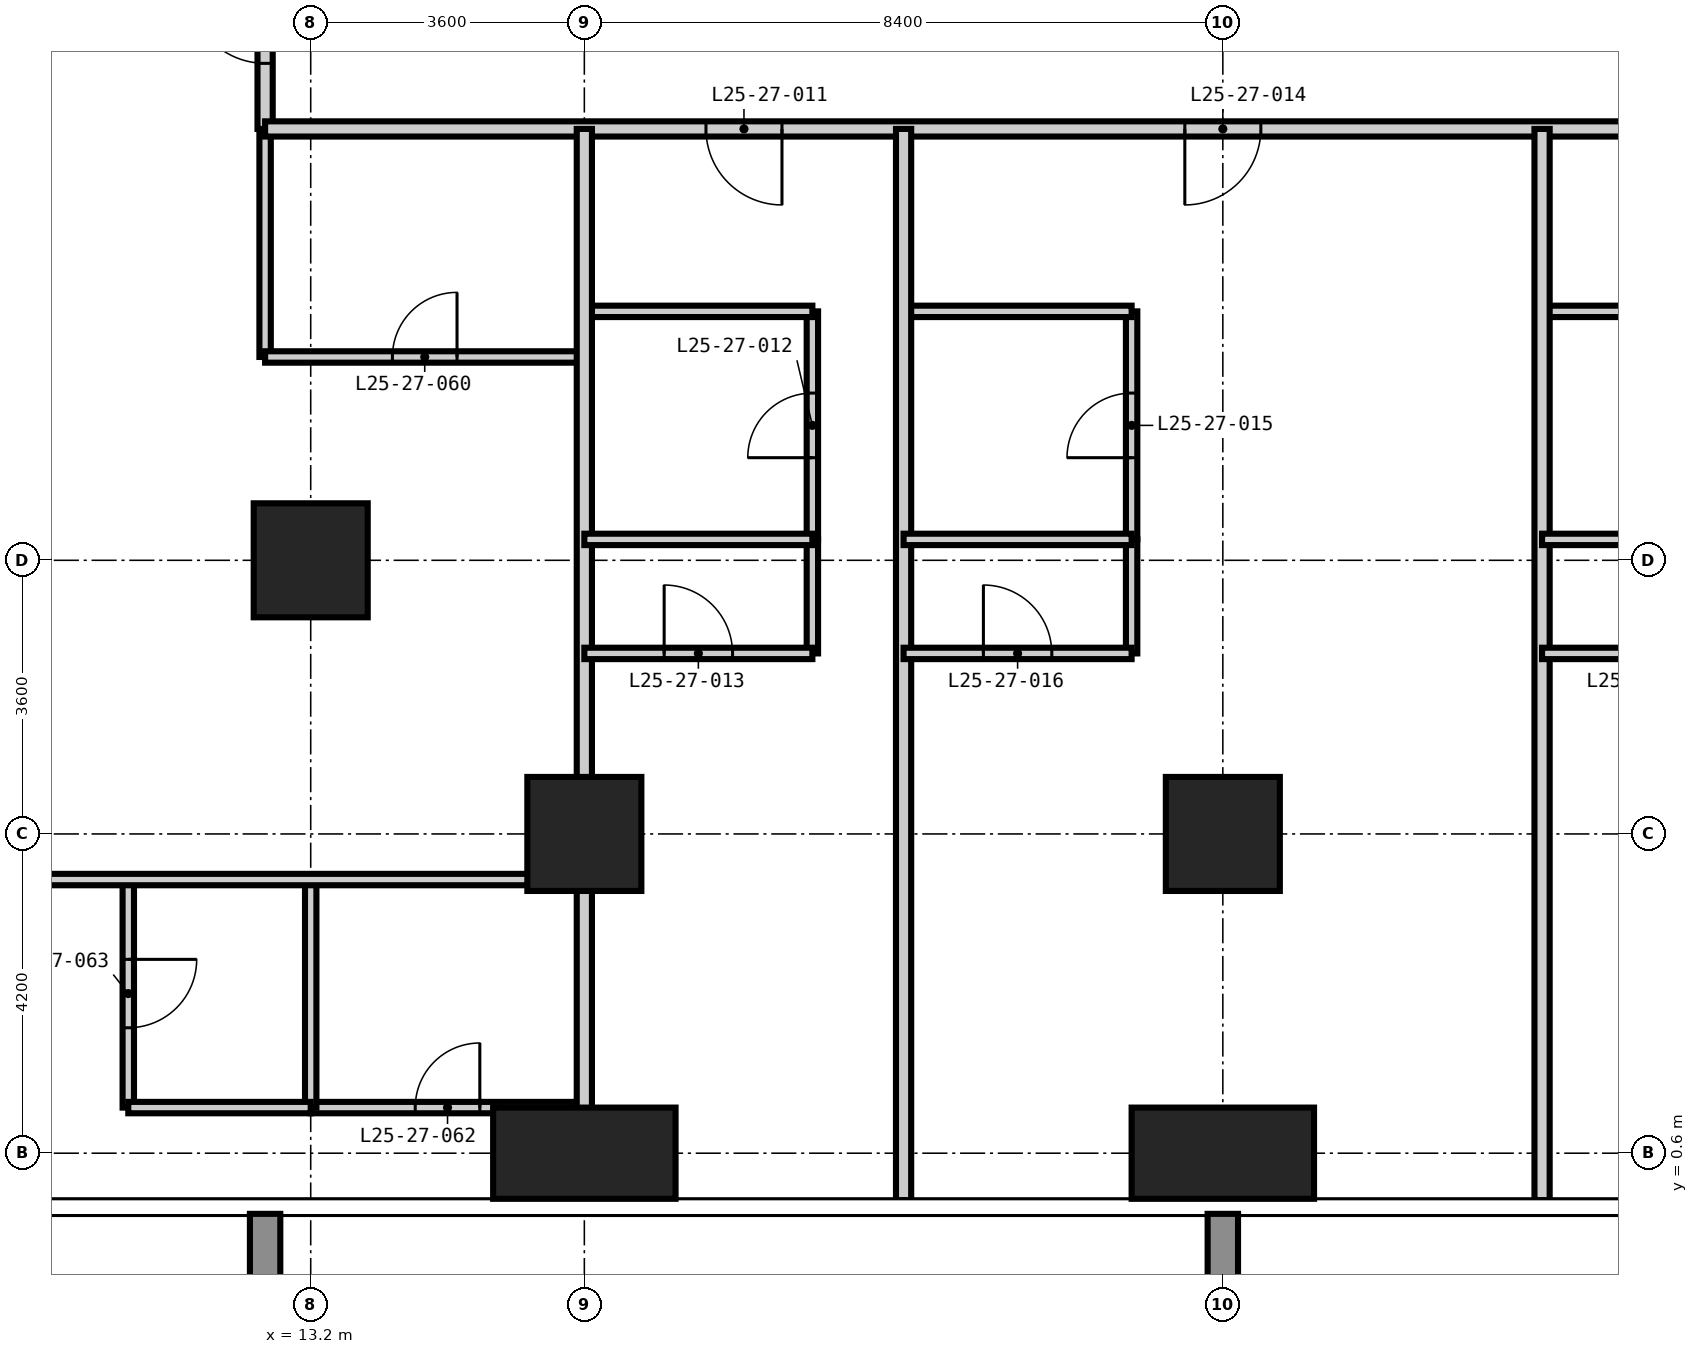
"""IFC4 building model, lengths in metres.
Left out: names, types, materials, properties, quantities, classifications, styles, units other than length and angle.
Written with IfcOpenShell. Run it as: python <this file> out.ifc"""

import sys

from ifc_helpers import new_model, si_unit, direction, frame, frame_2d, origin, origin_2d, place, context, subcontext, project, spatial, rectangle, extrude, element, fill, save


model = new_model("IFC4")
c1 = context("Model", 3, precision=1e-05, world=origin(), true_north=direction((0.0, 1.0)))
c2 = subcontext(c1, "Body", "Model", "MODEL_VIEW")
j1 = project(units=[si_unit("LENGTHUNIT", "METRE"), si_unit("PLANEANGLEUNIT", "RADIAN")], contexts=[c1])
p1 = place(None, origin())
s1 = spatial("IfcSite", under=j1, at=p1, CompositionType="ELEMENT")
p2 = place(p1, origin())
s2 = spatial("IfcBuilding", under=s1, at=p2, CompositionType="ELEMENT")
p3 = place(p2, frame((0.0, 0.0, 100.8)))
s3 = spatial("IfcBuildingStorey", under=s2, at=p3, CompositionType="ELEMENT", Elevation=100.8)
p4 = place(p3, frame((13.2, 8.4, -0.35), z_axis=(0.0, 0.0, 1.0), x_axis=(1.0, 0.0, 0.0)))
e1 = element("IfcColumn", 1, at=p4, inside=s3, PredefinedType="COLUMN", context=c2, shape_type="SweptSolid", body=[
    extrude(rectangle(XDim=1.5, YDim=1.5, at=origin_2d()), origin(), (0.0, 0.0, 1.0), 3.6),
])
p5 = place(p3, frame((16.8, 0.6, -0.35), z_axis=(0.0, 0.0, 1.0), x_axis=(1.0, 0.0, 0.0)))
e2 = element("IfcColumn", 2, at=p5, inside=s3, PredefinedType="COLUMN", context=c2, shape_type="SweptSolid", body=[
    extrude(rectangle(XDim=2.4, YDim=1.2, at=origin_2d()), origin(), (0.0, 0.0, 1.0), 3.6),
])
p6 = place(p3, frame((16.8, 4.8, -0.35), z_axis=(0.0, 0.0, 1.0), x_axis=(1.0, 0.0, 0.0)))
e3 = element("IfcColumn", 3, at=p6, inside=s3, PredefinedType="COLUMN", context=c2, shape_type="SweptSolid", body=[
    extrude(rectangle(XDim=1.5, YDim=1.5, at=origin_2d()), origin(), (0.0, 0.0, 1.0), 3.6),
])
p7 = place(p3, frame((25.2, 0.6, -0.35), z_axis=(0.0, 0.0, 1.0), x_axis=(1.0, 0.0, 0.0)))
e4 = element("IfcColumn", 4, at=p7, inside=s3, PredefinedType="COLUMN", context=c2, shape_type="SweptSolid", body=[
    extrude(rectangle(XDim=2.4, YDim=1.2, at=origin_2d()), origin(), (0.0, 0.0, 1.0), 3.6),
])
p8 = place(p3, frame((25.2, 4.8, -0.35), z_axis=(0.0, 0.0, 1.0), x_axis=(1.0, 0.0, 0.0)))
e5 = element("IfcColumn", 5, at=p8, inside=s3, PredefinedType="COLUMN", context=c2, shape_type="SweptSolid", body=[
    extrude(rectangle(XDim=1.5, YDim=1.5, at=origin_2d()), origin(), (0.0, 0.0, 1.0), 3.6),
])
p9 = place(p3, frame((12.6, 11.075, 0.0), z_axis=(0.0, 0.0, 1.0), x_axis=(0.0, 1.0, 0.0)))
e6 = element("IfcWall", 6, at=p9, inside=s3, PredefinedType="PARTITIONING", context=c2, shape_type="SweptSolid", body=[
    extrude(rectangle(XDim=3.0, YDim=0.15, at=frame_2d((1.5, 0.0))), origin(), (0.0, 0.0, 1.0), 3.25),
])
p10 = place(p3, frame((19.8, 8.675, 0.0), z_axis=(0.0, 0.0, 1.0), x_axis=(0.0, 1.0, 0.0)))
e7 = element("IfcWall", 7, at=p10, inside=s3, PredefinedType="PARTITIONING", context=c2, shape_type="SweptSolid", body=[
    extrude(rectangle(XDim=3.0, YDim=0.15, at=frame_2d((1.5, 0.0))), origin(), (0.0, 0.0, 1.0), 3.25),
])
p11 = place(p10, frame((1.075, 0.0, 0.0)))
e8 = element("IfcOpeningElement", 8, at=p11, cuts=e7, PredefinedType="OPENING", context=c2, shape_type="SweptSolid", body=[
    extrude(rectangle(XDim=0.85, YDim=2.1, at=frame_2d((0.425, 1.05))), frame((0.0, 0.085, 0.0), z_axis=(0.0, -1.0, 0.0), x_axis=(1.0, 0.0, 0.0)), (0.0, 0.0, 1.0), 0.17),
])
p12 = place(p3, frame((24.0, 8.675, 0.0), z_axis=(0.0, 0.0, 1.0), x_axis=(0.0, 1.0, 0.0)))
e9 = element("IfcWall", 9, at=p12, inside=s3, PredefinedType="PARTITIONING", context=c2, shape_type="SweptSolid", body=[
    extrude(rectangle(XDim=3.0, YDim=0.15, at=frame_2d((1.5, 0.0))), origin(), (0.0, 0.0, 1.0), 3.25),
])
p13 = place(p12, frame((1.075, 0.0, 0.0)))
e10 = element("IfcOpeningElement", 10, at=p13, cuts=e9, PredefinedType="OPENING", context=c2, shape_type="SweptSolid", body=[
    extrude(rectangle(XDim=0.85, YDim=2.1, at=frame_2d((0.425, 1.05))), frame((0.0, 0.085, 0.0), z_axis=(0.0, -1.0, 0.0), x_axis=(1.0, 0.0, 0.0)), (0.0, 0.0, 1.0), 0.17),
])
p14 = place(p3, frame((13.2, 1.2, 0.0), z_axis=(0.0, 0.0, 1.0), x_axis=(1.0, 0.0, 0.0)))
e11 = element("IfcWall", 11, at=p14, inside=s3, PredefinedType="PARTITIONING", context=c2, shape_type="SweptSolid", body=[
    extrude(rectangle(XDim=3.6, YDim=0.15, at=frame_2d((1.8, 0.0))), origin(), (0.0, 0.0, 1.0), 3.25),
])
p15 = place(p14, frame((1.375, 0.0, 0.0)))
e12 = element("IfcOpeningElement", 12, at=p15, cuts=e11, PredefinedType="OPENING", context=c2, shape_type="SweptSolid", body=[
    extrude(rectangle(XDim=0.85, YDim=2.1, at=frame_2d((0.425, 1.05))), frame((0.0, 0.085, 0.0), z_axis=(0.0, -1.0, 0.0), x_axis=(1.0, 0.0, 0.0)), (0.0, 0.0, 1.0), 0.17),
])
p16 = place(p3, frame((12.6, 11.075, 0.0), z_axis=(0.0, 0.0, 1.0), x_axis=(1.0, 0.0, 0.0)))
e13 = element("IfcWall", 13, at=p16, inside=s3, PredefinedType="PARTITIONING", context=c2, shape_type="SweptSolid", body=[
    extrude(rectangle(XDim=4.2, YDim=0.15, at=frame_2d((2.1, 0.0))), origin(), (0.0, 0.0, 1.0), 3.25),
])
p17 = place(p16, frame((1.675, 0.0, 0.0)))
e14 = element("IfcOpeningElement", 14, at=p17, cuts=e13, PredefinedType="OPENING", context=c2, shape_type="SweptSolid", body=[
    extrude(rectangle(XDim=0.85, YDim=2.1, at=frame_2d((0.425, 1.05))), frame((0.0, 0.085, 0.0), z_axis=(0.0, -1.0, 0.0), x_axis=(1.0, 0.0, 0.0)), (0.0, 0.0, 1.0), 0.17),
])
for number, where, z_axis, x_axis in (
    (15, (16.8, 11.675, 0.0), (0.0, 0.0, 1.0), (1.0, 0.0, 0.0)),
    (16, (21.0, 11.675, 0.0), (0.0, 0.0, 1.0), (1.0, 0.0, 0.0)),
    (17, (29.4, 11.675, 0.0), (0.0, 0.0, 1.0), (1.0, 0.0, 0.0)),
):
    element("IfcWall", number, at=place(p3, frame(where, z_axis=z_axis, x_axis=x_axis)), inside=s3, PredefinedType="PARTITIONING", context=c2, shape_type="SweptSolid", body=[
        extrude(rectangle(XDim=3.0, YDim=0.15, at=frame_2d((1.5, 0.0))), origin(), (0.0, 0.0, 1.0), 3.25),
    ])
p18 = place(p3, frame((12.6, 14.075, 0.0), z_axis=(0.0, 0.0, 1.0), x_axis=(0.0, 1.0, 0.0)))
e18 = element("IfcWall", 18, at=p18, inside=s3, PredefinedType="PARTITIONING", context=c2, shape_type="SweptSolid", body=[
    extrude(rectangle(XDim=31.25, YDim=0.2, at=frame_2d((15.625, 0.0))), origin(), (0.0, 0.0, 1.0), 3.25),
])
p19 = place(p18, frame((5.225, 0.0, 0.0)))
e19 = element("IfcOpeningElement", 19, at=p19, cuts=e18, PredefinedType="OPENING", context=c2, shape_type="SweptSolid", body=[
    extrude(rectangle(XDim=1.0, YDim=2.2, at=frame_2d((0.5, 1.1))), frame((0.0, 0.11, 0.0), z_axis=(0.0, -1.0, 0.0), x_axis=(1.0, 0.0, 0.0)), (0.0, 0.0, 1.0), 0.22),
])
p20 = place(p18, frame((13.625, 0.0, 0.0)))
e20 = element("IfcOpeningElement", 20, at=p20, cuts=e18, PredefinedType="OPENING", context=c2, shape_type="SweptSolid", body=[
    extrude(rectangle(XDim=1.0, YDim=2.2, at=frame_2d((0.5, 1.1))), frame((0.0, 0.11, 0.0), z_axis=(0.0, -1.0, 0.0), x_axis=(1.0, 0.0, 0.0)), (0.0, 0.0, 1.0), 0.22),
])
p21 = place(p18, frame((22.025, 0.0, 0.0)))
e21 = element("IfcOpeningElement", 21, at=p21, cuts=e18, PredefinedType="OPENING", context=c2, shape_type="SweptSolid", body=[
    extrude(rectangle(XDim=1.0, YDim=2.2, at=frame_2d((0.5, 1.1))), frame((0.0, 0.11, 0.0), z_axis=(0.0, -1.0, 0.0), x_axis=(1.0, 0.0, 0.0)), (0.0, 0.0, 1.0), 0.22),
])
p22 = place(p18, frame((0.863, 0.0, 0.0)))
e22 = element("IfcOpeningElement", 22, at=p22, cuts=e18, PredefinedType="OPENING", context=c2, shape_type="SweptSolid", body=[
    extrude(rectangle(XDim=1.0, YDim=2.2, at=frame_2d((0.5, 1.1))), frame((0.0, 0.11, 0.0), z_axis=(0.0, -1.0, 0.0), x_axis=(1.0, 0.0, 0.0)), (0.0, 0.0, 1.0), 0.22),
])
p23 = place(p18, frame((29.088, 0.0, 0.0)))
e23 = element("IfcOpeningElement", 23, at=p23, cuts=e18, PredefinedType="OPENING", context=c2, shape_type="SweptSolid", body=[
    extrude(rectangle(XDim=1.0, YDim=2.2, at=frame_2d((0.5, 1.1))), frame((0.0, 0.11, 0.0), z_axis=(0.0, -1.0, 0.0), x_axis=(1.0, 0.0, 0.0)), (0.0, 0.0, 1.0), 0.22),
])
p24 = place(p3, frame((45.925, 14.075, 0.0), z_axis=(0.0, 0.0, 1.0), x_axis=(-1.0, 0.0, 0.0)))
e24 = element("IfcWall", 24, at=p24, inside=s3, PredefinedType="PARTITIONING", context=c2, shape_type="SweptSolid", body=[
    extrude(rectangle(XDim=33.325, YDim=0.2, at=frame_2d((16.663, 0.0))), origin(), (0.0, 0.0, 1.0), 3.25),
])
p25 = place(p24, frame((26.525, 0.0, 0.0)))
e25 = element("IfcOpeningElement", 25, at=p25, cuts=e24, PredefinedType="OPENING", context=c2, shape_type="SweptSolid", body=[
    extrude(rectangle(XDim=1.0, YDim=2.2, at=frame_2d((0.5, 1.1))), frame((0.0, 0.11, 0.0), z_axis=(0.0, -1.0, 0.0), x_axis=(1.0, 0.0, 0.0)), (0.0, 0.0, 1.0), 0.22),
])
p26 = place(p24, frame((20.225, 0.0, 0.0)))
e26 = element("IfcOpeningElement", 26, at=p26, cuts=e24, PredefinedType="OPENING", context=c2, shape_type="SweptSolid", body=[
    extrude(rectangle(XDim=1.0, YDim=2.2, at=frame_2d((0.5, 1.1))), frame((0.0, 0.11, 0.0), z_axis=(0.0, -1.0, 0.0), x_axis=(1.0, 0.0, 0.0)), (0.0, 0.0, 1.0), 0.22),
])
p27 = place(p24, frame((11.825, 0.0, 0.0)))
e27 = element("IfcOpeningElement", 27, at=p27, cuts=e24, PredefinedType="OPENING", context=c2, shape_type="SweptSolid", body=[
    extrude(rectangle(XDim=1.0, YDim=2.2, at=frame_2d((0.5, 1.1))), frame((0.0, 0.11, 0.0), z_axis=(0.0, -1.0, 0.0), x_axis=(1.0, 0.0, 0.0)), (0.0, 0.0, 1.0), 0.22),
])
p28 = place(p24, frame((5.525, 0.0, 0.0)))
e28 = element("IfcOpeningElement", 28, at=p28, cuts=e24, PredefinedType="OPENING", context=c2, shape_type="SweptSolid", body=[
    extrude(rectangle(XDim=1.0, YDim=2.2, at=frame_2d((0.5, 1.1))), frame((0.0, 0.11, 0.0), z_axis=(0.0, -1.0, 0.0), x_axis=(1.0, 0.0, 0.0)), (0.0, 0.0, 1.0), 0.22),
])
for number, where, z_axis, x_axis in (
    (29, (16.8, -0.018, 0.0), (0.0, 0.0, 1.0), (0.0, 1.0, 0.0)),
    (30, (21.0, -0.018, 0.0), (0.0, 0.0, 1.0), (0.0, 1.0, 0.0)),
    (31, (29.4, -0.018, 0.0), (0.0, 0.0, 1.0), (0.0, 1.0, 0.0)),
):
    element("IfcWall", number, at=place(p3, frame(where, z_axis=z_axis, x_axis=x_axis)), inside=s3, PredefinedType="PARTITIONING", context=c2, shape_type="SweptSolid", body=[
        extrude(rectangle(XDim=14.093, YDim=0.2, at=frame_2d((7.046, 0.0))), origin(), (0.0, 0.0, 1.0), 3.25),
    ])
p29 = place(p3, frame((10.8, 1.2, 0.0), z_axis=(0.0, 0.0, 1.0), x_axis=(0.0, 1.0, 0.0)))
e32 = element("IfcWall", 32, at=p29, inside=s3, PredefinedType="PARTITIONING", context=c2, shape_type="SweptSolid", body=[
    extrude(rectangle(XDim=3.0, YDim=0.15, at=frame_2d((1.5, 0.0))), origin(), (0.0, 0.0, 1.0), 3.25),
])
p30 = place(p29, frame((1.05, 0.0, 0.0)))
e33 = element("IfcOpeningElement", 33, at=p30, cuts=e32, PredefinedType="OPENING", context=c2, shape_type="SweptSolid", body=[
    extrude(rectangle(XDim=0.9, YDim=2.1, at=frame_2d((0.45, 1.05))), frame((0.0, 0.085, 0.0), z_axis=(0.0, -1.0, 0.0), x_axis=(1.0, 0.0, 0.0)), (0.0, 0.0, 1.0), 0.17),
])
p31 = place(p3, frame((13.2, 1.2, 0.0), z_axis=(0.0, 0.0, 1.0), x_axis=(0.0, 1.0, 0.0)))
e34 = element("IfcWall", 34, at=p31, inside=s3, PredefinedType="PARTITIONING", context=c2, shape_type="SweptSolid", body=[
    extrude(rectangle(XDim=3.0, YDim=0.15, at=frame_2d((1.5, 0.0))), origin(), (0.0, 0.0, 1.0), 3.25),
])
for number, where, z_axis, x_axis in (
    (35, (19.8, 7.175, 0.0), (0.0, 0.0, 1.0), (0.0, 1.0, 0.0)),
    (36, (24.0, 7.175, 0.0), (0.0, 0.0, 1.0), (0.0, 1.0, 0.0)),
):
    element("IfcWall", number, at=place(p3, frame(where, z_axis=z_axis, x_axis=x_axis)), inside=s3, PredefinedType="PARTITIONING", context=c2, shape_type="SweptSolid", body=[
        extrude(rectangle(XDim=1.5, YDim=0.15, at=frame_2d((0.75, 0.0))), origin(), (0.0, 0.0, 1.0), 3.25),
    ])
p32 = place(p3, frame((10.8, 1.2, 0.0), z_axis=(0.0, 0.0, 1.0), x_axis=(1.0, 0.0, 0.0)))
e37 = element("IfcWall", 37, at=p32, inside=s3, PredefinedType="PARTITIONING", context=c2, shape_type="SweptSolid", body=[
    extrude(rectangle(XDim=2.4, YDim=0.15, at=frame_2d((1.2, 0.0))), origin(), (0.0, 0.0, 1.0), 3.25),
])
p33 = place(p3, frame((-0.018, 4.2, 0.0), z_axis=(0.0, 0.0, 1.0), x_axis=(1.0, 0.0, 0.0)))
e38 = element("IfcWall", 38, at=p33, inside=s3, PredefinedType="PARTITIONING", context=c2, shape_type="SweptSolid", body=[
    extrude(rectangle(XDim=16.818, YDim=0.15, at=frame_2d((8.409, 0.0))), origin(), (0.0, 0.0, 1.0), 3.25),
])
p34 = place(p33, frame((4.968, 0.0, 0.0)))
e39 = element("IfcOpeningElement", 39, at=p34, cuts=e38, PredefinedType="OPENING", context=c2, shape_type="SweptSolid", body=[
    extrude(rectangle(XDim=0.9, YDim=2.1, at=frame_2d((0.45, 1.05))), frame((0.0, 0.085, 0.0), z_axis=(0.0, -1.0, 0.0), x_axis=(1.0, 0.0, 0.0)), (0.0, 0.0, 1.0), 0.17),
])
p35 = place(p3, frame((16.8, 7.175, 0.0), z_axis=(0.0, 0.0, 1.0), x_axis=(1.0, 0.0, 0.0)))
e40 = element("IfcWall", 40, at=p35, inside=s3, PredefinedType="PARTITIONING", context=c2, shape_type="SweptSolid", body=[
    extrude(rectangle(XDim=3.0, YDim=0.15, at=frame_2d((1.5, 0.0))), origin(), (0.0, 0.0, 1.0), 3.25),
])
p36 = place(p35, frame((1.05, 0.0, 0.0)))
e41 = element("IfcOpeningElement", 41, at=p36, cuts=e40, PredefinedType="OPENING", context=c2, shape_type="SweptSolid", body=[
    extrude(rectangle(XDim=0.9, YDim=2.1, at=frame_2d((0.45, 1.05))), frame((0.0, 0.085, 0.0), z_axis=(0.0, -1.0, 0.0), x_axis=(1.0, 0.0, 0.0)), (0.0, 0.0, 1.0), 0.17),
])
p37 = place(p3, frame((21.0, 7.175, 0.0), z_axis=(0.0, 0.0, 1.0), x_axis=(1.0, 0.0, 0.0)))
e42 = element("IfcWall", 42, at=p37, inside=s3, PredefinedType="PARTITIONING", context=c2, shape_type="SweptSolid", body=[
    extrude(rectangle(XDim=3.0, YDim=0.15, at=frame_2d((1.5, 0.0))), origin(), (0.0, 0.0, 1.0), 3.25),
])
p38 = place(p37, frame((1.05, 0.0, 0.0)))
e43 = element("IfcOpeningElement", 43, at=p38, cuts=e42, PredefinedType="OPENING", context=c2, shape_type="SweptSolid", body=[
    extrude(rectangle(XDim=0.9, YDim=2.1, at=frame_2d((0.45, 1.05))), frame((0.0, 0.085, 0.0), z_axis=(0.0, -1.0, 0.0), x_axis=(1.0, 0.0, 0.0)), (0.0, 0.0, 1.0), 0.17),
])
p39 = place(p3, frame((29.4, 7.175, 0.0), z_axis=(0.0, 0.0, 1.0), x_axis=(1.0, 0.0, 0.0)))
e44 = element("IfcWall", 44, at=p39, inside=s3, PredefinedType="PARTITIONING", context=c2, shape_type="SweptSolid", body=[
    extrude(rectangle(XDim=3.0, YDim=0.15, at=frame_2d((1.5, 0.0))), origin(), (0.0, 0.0, 1.0), 3.25),
])
p40 = place(p39, frame((1.05, 0.0, 0.0)))
e45 = element("IfcOpeningElement", 45, at=p40, cuts=e44, PredefinedType="OPENING", context=c2, shape_type="SweptSolid", body=[
    extrude(rectangle(XDim=0.9, YDim=2.1, at=frame_2d((0.45, 1.05))), frame((0.0, 0.085, 0.0), z_axis=(0.0, -1.0, 0.0), x_axis=(1.0, 0.0, 0.0)), (0.0, 0.0, 1.0), 0.17),
])
for number, where, z_axis, x_axis in (
    (46, (16.8, 8.675, 0.0), (0.0, 0.0, 1.0), (1.0, 0.0, 0.0)),
    (47, (21.0, 8.675, 0.0), (0.0, 0.0, 1.0), (1.0, 0.0, 0.0)),
    (48, (29.4, 8.675, 0.0), (0.0, 0.0, 1.0), (1.0, 0.0, 0.0)),
):
    element("IfcWall", number, at=place(p3, frame(where, z_axis=z_axis, x_axis=x_axis)), inside=s3, PredefinedType="PARTITIONING", context=c2, shape_type="SweptSolid", body=[
        extrude(rectangle(XDim=3.0, YDim=0.15, at=frame_2d((1.5, 0.0))), origin(), (0.0, 0.0, 1.0), 3.25),
    ])
p41 = place(p25, origin())
e49 = element("IfcDoor", 49, at=p41, inside=s3, OperationType="SINGLE_SWING_LEFT", PredefinedType="DOOR", context=c2, shape_type="SweptSolid", body=[
    extrude(rectangle(XDim=1.0, YDim=2.2, at=frame_2d((0.5, 1.1))), frame((0.0, 0.025, 0.0), z_axis=(0.0, -1.0, 0.0), x_axis=(1.0, 0.0, 0.0)), (0.0, 0.0, 1.0), 0.05),
])
fill(e25, e49)
p42 = place(p11, origin())
e50 = element("IfcDoor", 50, at=p42, inside=s3, OperationType="SINGLE_SWING_LEFT", PredefinedType="DOOR", context=c2, shape_type="SweptSolid", body=[
    extrude(rectangle(XDim=0.85, YDim=2.1, at=frame_2d((0.425, 1.05))), frame((0.0, 0.025, 0.0), z_axis=(0.0, -1.0, 0.0), x_axis=(1.0, 0.0, 0.0)), (0.0, 0.0, 1.0), 0.05),
])
fill(e8, e50)
p43 = place(p36, origin())
e51 = element("IfcDoor", 51, at=p43, inside=s3, OperationType="SINGLE_SWING_LEFT", PredefinedType="DOOR", context=c2, shape_type="SweptSolid", body=[
    extrude(rectangle(XDim=0.9, YDim=2.1, at=frame_2d((0.45, 1.05))), frame((0.0, 0.025, 0.0), z_axis=(0.0, -1.0, 0.0), x_axis=(1.0, 0.0, 0.0)), (0.0, 0.0, 1.0), 0.05),
])
fill(e41, e51)
p44 = place(p26, origin())
e52 = element("IfcDoor", 52, at=p44, inside=s3, OperationType="SINGLE_SWING_RIGHT", PredefinedType="DOOR", context=c2, shape_type="SweptSolid", body=[
    extrude(rectangle(XDim=1.0, YDim=2.2, at=frame_2d((0.5, 1.1))), frame((0.0, 0.025, 0.0), z_axis=(0.0, -1.0, 0.0), x_axis=(1.0, 0.0, 0.0)), (0.0, 0.0, 1.0), 0.05),
])
fill(e26, e52)
p45 = place(p13, origin())
e53 = element("IfcDoor", 53, at=p45, inside=s3, OperationType="SINGLE_SWING_LEFT", PredefinedType="DOOR", context=c2, shape_type="SweptSolid", body=[
    extrude(rectangle(XDim=0.85, YDim=2.1, at=frame_2d((0.425, 1.05))), frame((0.0, 0.025, 0.0), z_axis=(0.0, -1.0, 0.0), x_axis=(1.0, 0.0, 0.0)), (0.0, 0.0, 1.0), 0.05),
])
fill(e10, e53)
p46 = place(p38, origin())
e54 = element("IfcDoor", 54, at=p46, inside=s3, OperationType="SINGLE_SWING_LEFT", PredefinedType="DOOR", context=c2, shape_type="SweptSolid", body=[
    extrude(rectangle(XDim=0.9, YDim=2.1, at=frame_2d((0.45, 1.05))), frame((0.0, 0.025, 0.0), z_axis=(0.0, -1.0, 0.0), x_axis=(1.0, 0.0, 0.0)), (0.0, 0.0, 1.0), 0.05),
])
fill(e43, e54)
p47 = place(p22, origin())
e55 = element("IfcDoor", 55, at=p47, inside=s3, OperationType="SINGLE_SWING_RIGHT", PredefinedType="DOOR", context=c2, shape_type="SweptSolid", body=[
    extrude(rectangle(XDim=1.0, YDim=2.2, at=frame_2d((0.5, 1.1))), frame((0.0, 0.025, 0.0), z_axis=(0.0, -1.0, 0.0), x_axis=(1.0, 0.0, 0.0)), (0.0, 0.0, 1.0), 0.05),
])
fill(e22, e55)
p48 = place(p17, origin())
e56 = element("IfcDoor", 56, at=p48, inside=s3, OperationType="SINGLE_SWING_RIGHT", PredefinedType="DOOR", context=c2, shape_type="SweptSolid", body=[
    extrude(rectangle(XDim=0.85, YDim=2.1, at=frame_2d((0.425, 1.05))), frame((0.0, 0.025, 0.0), z_axis=(0.0, -1.0, 0.0), x_axis=(1.0, 0.0, 0.0)), (0.0, 0.0, 1.0), 0.05),
])
fill(e14, e56)
p49 = place(p15, origin())
e57 = element("IfcDoor", 57, at=p49, inside=s3, OperationType="SINGLE_SWING_RIGHT", PredefinedType="DOOR", context=c2, shape_type="SweptSolid", body=[
    extrude(rectangle(XDim=0.85, YDim=2.1, at=frame_2d((0.425, 1.05))), frame((0.0, 0.025, 0.0), z_axis=(0.0, -1.0, 0.0), x_axis=(1.0, 0.0, 0.0)), (0.0, 0.0, 1.0), 0.05),
])
fill(e12, e57)
p50 = place(p30, frame((0.9, 0.0, 0.0), z_axis=(0.0, 0.0, 1.0), x_axis=(-1.0, 0.0, 0.0)))
e58 = element("IfcDoor", 58, at=p50, inside=s3, OperationType="SINGLE_SWING_LEFT", PredefinedType="DOOR", context=c2, shape_type="SweptSolid", body=[
    extrude(rectangle(XDim=0.9, YDim=2.1, at=frame_2d((0.45, 1.05))), frame((0.0, 0.025, 0.0), z_axis=(0.0, -1.0, 0.0), x_axis=(1.0, 0.0, 0.0)), (0.0, 0.0, 1.0), 0.05),
])
fill(e33, e58)
save(model, sys.argv[1])
